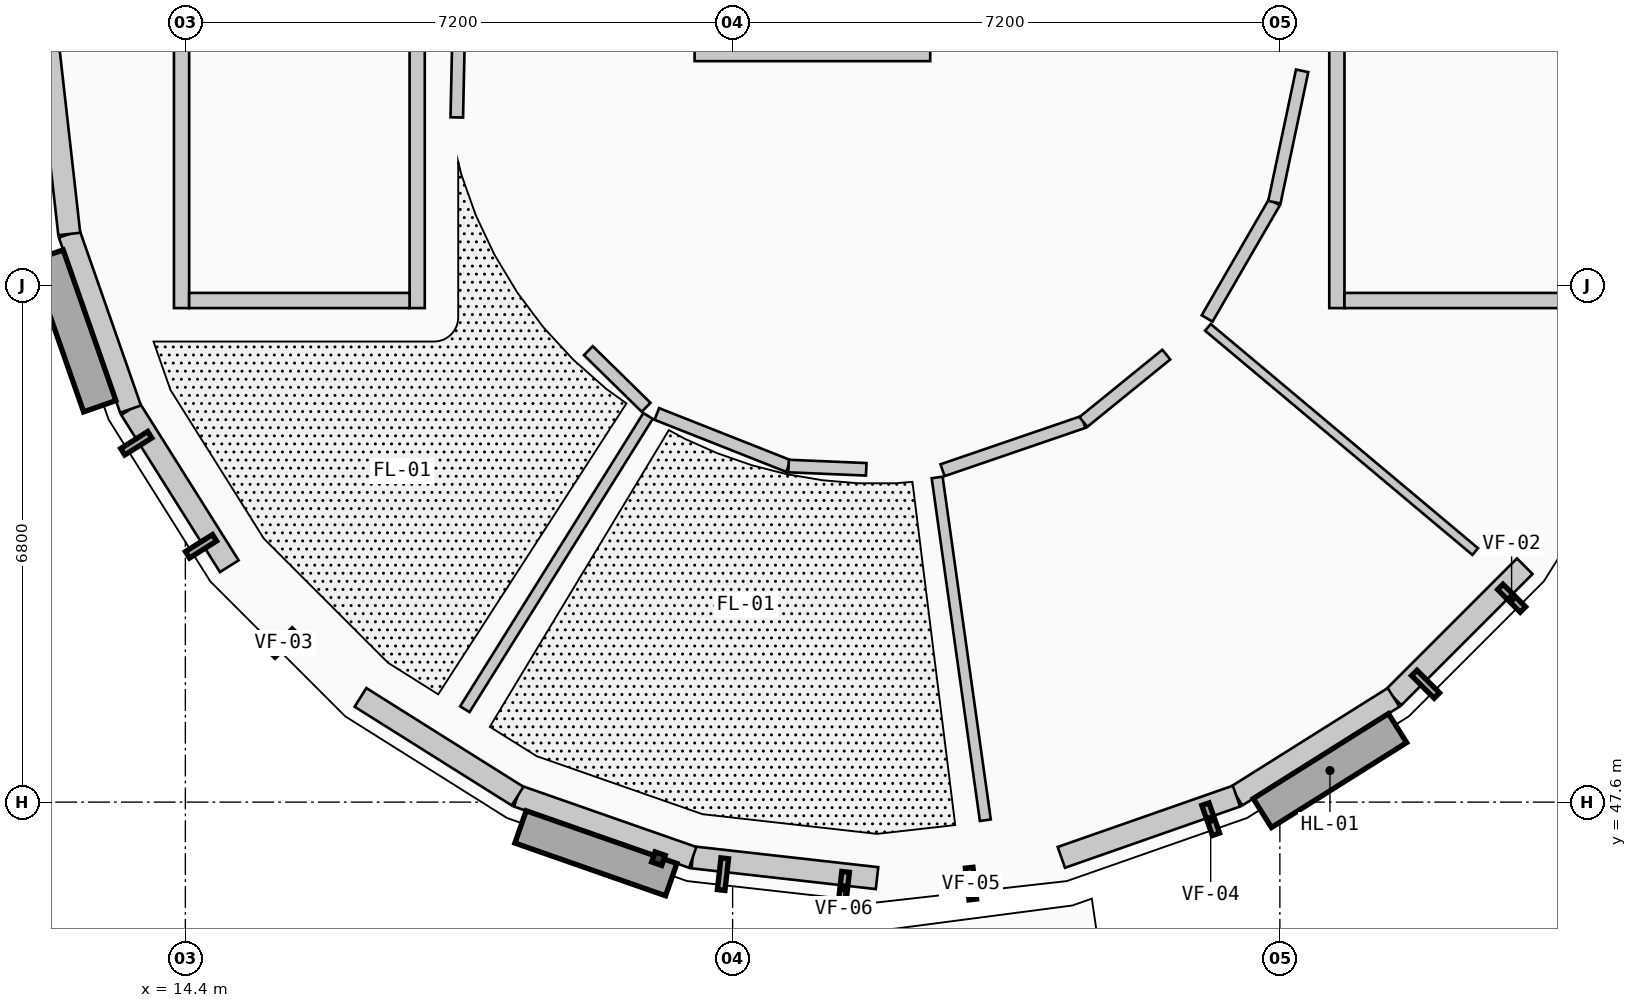
"""IFC4 building model, lengths in metres.
Left out: names, types, materials, properties, quantities, classifications, styles, units other than length and angle.
Written with IfcOpenShell. Run it as: python <this file> out.ifc"""

import sys

from ifc_helpers import new_model, si_unit, direction, frame, frame_2d, origin, origin_2d, place, context, subcontext, project, spatial, rectangle, circle, extrude, element, fill, save


model = new_model("IFC4")
c1 = context("Model", 3, precision=1e-05, world=origin(), true_north=direction((0.0, 1.0)))
c2 = subcontext(c1, "Body", "Model", "MODEL_VIEW")
j1 = project(units=[si_unit("LENGTHUNIT", "METRE"), si_unit("PLANEANGLEUNIT", "RADIAN")], contexts=[c1])
p1 = place(None, origin())
s1 = spatial("IfcSite", under=j1, at=p1, CompositionType="ELEMENT")
p2 = place(p1, origin())
s2 = spatial("IfcBuilding", under=s1, at=p2, CompositionType="ELEMENT")
p3 = place(p2, frame((0.0, 0.0, 4.55)))
s3 = spatial("IfcBuildingStorey", under=s2, at=p3, CompositionType="ELEMENT", Elevation=4.55)
for number, where, z_axis, x_axis in (
    (1, (13.12, 57.5, 0.0), (0.0, 0.0, 1.0), (1.0, 0.0, 0.0)),
    (2, (14.148, 52.996, 0.0), (0.0, 0.0, 1.0), (1.0, 0.0, 0.0)),
    (3, (17.028, 49.385, 0.0), (0.0, 0.0, 1.0), (1.0, 0.0, 0.0)),
    (4, (21.19, 47.38, 0.0), (0.0, 0.0, 1.0), (1.0, 0.0, 0.0)),
    (5, (25.81, 47.38, 0.0), (0.0, 0.0, 1.0), (1.0, 0.0, 0.0)),
    (6, (29.972, 49.385, 0.0), (0.0, 0.0, 1.0), (1.0, 0.0, 0.0)),
    (7, (19.54, 53.54, 0.0), (0.0, 0.0, 1.0), (1.0, 0.0, 0.0)),
    (8, (23.5, 51.9, 0.0), (0.0, 0.0, 1.0), (1.0, 0.0, 0.0)),
    (9, (27.46, 53.54, 0.0), (0.0, 0.0, 1.0), (1.0, 0.0, 0.0)),
):
    element("IfcColumn", number, at=place(p3, frame(where, z_axis=z_axis, x_axis=x_axis)), inside=s3, PredefinedType="COLUMN", context=c2, shape_type="SweptSolid", body=[
        extrude(rectangle(XDim=0.315, YDim=0.315, at=origin_2d()), origin(), (0.0, 0.0, 1.0), 4.2),
    ])
for number, where, z_axis, x_axis in (
    (10, (26.15, 46.154, 0.0), (0.0, 0.0, 1.0), (1.0, 0.0, 0.0)),
    (11, (15.613, 47.61, 0.0), (0.0, 0.0, 1.0), (1.0, 0.0, 0.0)),
    (12, (31.387, 47.61, 0.0), (0.0, 0.0, 1.0), (1.0, 0.0, 0.0)),
):
    element("IfcColumn", number, at=place(p3, frame(where, z_axis=z_axis, x_axis=x_axis)), inside=s3, PredefinedType="PILASTER", context=c2, shape_type="SweptSolid", body=[
        extrude(circle(Radius=0.19, at=origin_2d()), origin(), (0.0, 0.0, 1.0), 4.2),
    ])
p4 = place(p3, frame((32.022, 50.704, 0.0), z_axis=(0.0, 0.0, 1.0), x_axis=(-0.707106781187, -0.707106781187, 0.0)))
e13 = element("IfcWall", 13, at=p4, inside=s3, PredefinedType="ELEMENTEDWALL", context=c2, shape_type="SweptSolid", body=[
    extrude(rectangle(XDim=2.441, YDim=0.29, at=frame_2d((1.22, 0.0))), origin(), (0.0, 0.0, 1.0), 3.314),
])
p5 = place(p4, frame((0.695, 0.0, 0.85)))
e14 = element("IfcOpeningElement", 14, at=p5, cuts=e13, PredefinedType="OPENING", context=c2, shape_type="SweptSolid", body=[
    extrude(rectangle(XDim=1.05, YDim=1.35, at=frame_2d((0.525, 0.675))), frame((0.0, 0.155, 0.0), z_axis=(0.0, -1.0, 0.0), x_axis=(1.0, 0.0, 0.0)), (0.0, 0.0, 1.0), 0.31),
])
p6 = place(p3, frame((30.296, 48.978, 0.0), z_axis=(0.0, 0.0, 1.0), x_axis=(-0.846658434148, -0.532136726684, 0.0)))
e15 = element("IfcWall", 15, at=p6, inside=s3, PredefinedType="ELEMENTEDWALL", context=c2, shape_type="SweptSolid", body=[
    extrude(rectangle(XDim=2.441, YDim=0.29, at=frame_2d((1.221, 0.0))), origin(), (0.0, 0.0, 1.0), 3.314),
])
p7 = place(p6, frame((0.696, 0.0, 0.85)))
e16 = element("IfcOpeningElement", 16, at=p7, cuts=e15, PredefinedType="OPENING", context=c2, shape_type="SweptSolid", body=[
    extrude(rectangle(XDim=1.05, YDim=1.6, at=frame_2d((0.525, 0.8))), frame((0.0, 0.155, 0.0), z_axis=(0.0, -1.0, 0.0), x_axis=(1.0, 0.0, 0.0)), (0.0, 0.0, 1.0), 0.31),
])
p8 = place(p3, frame((28.229, 47.679, 0.0), z_axis=(0.0, 0.0, 1.0), x_axis=(-0.943919156274, -0.330176659411, 0.0)))
e17 = element("IfcWall", 17, at=p8, inside=s3, PredefinedType="ELEMENTEDWALL", context=c2, shape_type="SweptSolid", body=[
    extrude(rectangle(XDim=2.441, YDim=0.29, at=frame_2d((1.22, 0.0))), origin(), (0.0, 0.0, 1.0), 3.314),
])
p9 = place(p8, frame((0.695, 0.0, 0.85)))
e18 = element("IfcOpeningElement", 18, at=p9, cuts=e17, PredefinedType="OPENING", context=c2, shape_type="SweptSolid", body=[
    extrude(rectangle(XDim=1.05, YDim=1.9, at=frame_2d((0.525, 0.95))), frame((0.0, 0.155, 0.0), z_axis=(0.0, -1.0, 0.0), x_axis=(1.0, 0.0, 0.0)), (0.0, 0.0, 1.0), 0.31),
])
p10 = place(p3, frame((23.5, 46.6, 0.0), z_axis=(0.0, 0.0, 1.0), x_axis=(-0.993725340882, 0.111847873866, 0.0)))
e19 = element("IfcWall", 19, at=p10, inside=s3, PredefinedType="ELEMENTEDWALL", context=c2, shape_type="SweptSolid", body=[
    extrude(rectangle(XDim=2.44, YDim=0.29, at=frame_2d((1.22, 0.0))), origin(), (0.0, 0.0, 1.0), 3.314),
])
p11 = place(p10, frame((0.695, 0.0, 0.85)))
e20 = element("IfcOpeningElement", 20, at=p11, cuts=e19, PredefinedType="OPENING", context=c2, shape_type="SweptSolid", body=[
    extrude(rectangle(XDim=1.05, YDim=2.15, at=frame_2d((0.525, 1.075))), frame((0.0, 0.155, 0.0), z_axis=(0.0, -1.0, 0.0), x_axis=(1.0, 0.0, 0.0)), (0.0, 0.0, 1.0), 0.31),
])
p12 = place(p3, frame((21.075, 46.873, 0.0), z_axis=(0.0, 0.0, 1.0), x_axis=(-0.943919156274, 0.330176659411, 0.0)))
e21 = element("IfcWall", 21, at=p12, inside=s3, PredefinedType="ELEMENTEDWALL", context=c2, shape_type="SweptSolid", body=[
    extrude(rectangle(XDim=2.441, YDim=0.29, at=frame_2d((1.22, 0.0))), origin(), (0.0, 0.0, 1.0), 3.314),
])
p13 = place(p12, frame((0.68, 0.0, 0.85)))
e22 = element("IfcOpeningElement", 22, at=p13, cuts=e21, PredefinedType="OPENING", context=c2, shape_type="SweptSolid", body=[
    extrude(rectangle(XDim=1.08, YDim=1.5, at=frame_2d((0.54, 0.75))), frame((0.0, 0.155, 0.0), z_axis=(0.0, -1.0, 0.0), x_axis=(1.0, 0.0, 0.0)), (0.0, 0.0, 1.0), 0.31),
])
p14 = place(p3, frame((18.771, 47.679, 0.0), z_axis=(0.0, 0.0, 1.0), x_axis=(-0.846658434148, 0.532136726684, 0.0)))
e23 = element("IfcWall", 23, at=p14, inside=s3, PredefinedType="ELEMENTEDWALL", context=c2, shape_type="SweptSolid", body=[
    extrude(rectangle(XDim=2.441, YDim=0.29, at=frame_2d((1.221, 0.0))), origin(), (0.0, 0.0, 1.0), 3.314),
])
p15 = place(p14, frame((0.681, 0.0, 0.85)))
e24 = element("IfcOpeningElement", 24, at=p15, cuts=e23, PredefinedType="OPENING", context=c2, shape_type="SweptSolid", body=[
    extrude(rectangle(XDim=1.08, YDim=1.8, at=frame_2d((0.54, 0.9))), frame((0.0, 0.155, 0.0), z_axis=(0.0, -1.0, 0.0), x_axis=(1.0, 0.0, 0.0)), (0.0, 0.0, 1.0), 0.31),
])
p16 = place(p3, frame((14.978, 50.704, 0.0), z_axis=(0.0, 0.0, 1.0), x_axis=(-0.532136726684, 0.846658434148, 0.0)))
e25 = element("IfcWall", 25, at=p16, inside=s3, PredefinedType="ELEMENTEDWALL", context=c2, shape_type="SweptSolid", body=[
    extrude(rectangle(XDim=2.441, YDim=0.29, at=frame_2d((1.221, 0.0))), origin(), (0.0, 0.0, 1.0), 3.314),
])
p17 = place(p16, frame((0.671, 0.0, 0.85)))
e26 = element("IfcOpeningElement", 26, at=p17, cuts=e25, PredefinedType="OPENING", context=c2, shape_type="SweptSolid", body=[
    extrude(rectangle(XDim=1.1, YDim=1.25, at=frame_2d((0.55, 0.625))), frame((0.0, 0.155, 0.0), z_axis=(0.0, -1.0, 0.0), x_axis=(1.0, 0.0, 0.0)), (0.0, 0.0, 1.0), 0.31),
])
p18 = place(p3, frame((13.679, 52.771, 0.0), z_axis=(0.0, 0.0, 1.0), x_axis=(-0.330176659411, 0.943919156274, 0.0)))
e27 = element("IfcWall", 27, at=p18, inside=s3, PredefinedType="ELEMENTEDWALL", context=c2, shape_type="SweptSolid", body=[
    extrude(rectangle(XDim=2.441, YDim=0.29, at=frame_2d((1.22, 0.0))), origin(), (0.0, 0.0, 1.0), 3.314),
])
p19 = place(p18, frame((0.67, 0.0, 0.85)))
e28 = element("IfcOpeningElement", 28, at=p19, cuts=e27, PredefinedType="OPENING", context=c2, shape_type="SweptSolid", body=[
    extrude(rectangle(XDim=1.1, YDim=1.5, at=frame_2d((0.55, 0.75))), frame((0.0, 0.155, 0.0), z_axis=(0.0, -1.0, 0.0), x_axis=(1.0, 0.0, 0.0)), (0.0, 0.0, 1.0), 0.31),
])
p20 = place(p3, frame((12.873, 55.075, 0.0), z_axis=(0.0, 0.0, 1.0), x_axis=(-0.111847873866, 0.993725340882, 0.0)))
e29 = element("IfcWall", 29, at=p20, inside=s3, PredefinedType="ELEMENTEDWALL", context=c2, shape_type="SweptSolid", body=[
    extrude(rectangle(XDim=2.44, YDim=0.29, at=frame_2d((1.22, 0.0))), origin(), (0.0, 0.0, 1.0), 3.314),
])
p21 = place(p3, frame((29.55, 60.9, 0.0), z_axis=(0.0, 0.0, 1.0), x_axis=(0.0, -1.0, 0.0)))
e30 = element("IfcWall", 30, at=p21, inside=s3, PredefinedType="SHEAR", context=c2, shape_type="SweptSolid", body=[
    extrude(rectangle(XDim=6.8, YDim=0.2, at=frame_2d((3.4, 0.0))), origin(), (0.0, 0.0, 1.0), 3.96),
])
p22 = place(p21, frame((0.38, 0.0, 0.0)))
e31 = element("IfcOpeningElement", 31, at=p22, cuts=e30, PredefinedType="OPENING", context=c2, shape_type="SweptSolid", body=[
    extrude(rectangle(XDim=1.1, YDim=2.15, at=frame_2d((0.55, 1.075))), frame((0.0, 0.11, 0.0), z_axis=(0.0, -1.0, 0.0), x_axis=(1.0, 0.0, 0.0)), (0.0, 0.0, 1.0), 0.22),
])
p23 = place(p3, frame((29.65, 54.2, 0.0), z_axis=(0.0, 0.0, 1.0), x_axis=(1.0, 0.0, 0.0)))
e32 = element("IfcWall", 32, at=p23, inside=s3, PredefinedType="SHEAR", context=c2, shape_type="SweptSolid", body=[
    extrude(rectangle(XDim=2.9, YDim=0.2, at=frame_2d((1.45, 0.0))), origin(), (0.0, 0.0, 1.0), 3.96),
])
p24 = place(p3, frame((17.45, 54.1, 0.0), z_axis=(0.0, 0.0, 1.0), x_axis=(0.0, 1.0, 0.0)))
e33 = element("IfcWall", 33, at=p24, inside=s3, PredefinedType="SHEAR", context=c2, shape_type="SweptSolid", body=[
    extrude(rectangle(XDim=6.8, YDim=0.2, at=frame_2d((3.4, 0.0))), origin(), (0.0, 0.0, 1.0), 3.96),
])
p25 = place(p24, frame((0.38, 0.0, 0.0)))
e34 = element("IfcOpeningElement", 34, at=p25, cuts=e33, PredefinedType="OPENING", context=c2, shape_type="SweptSolid", body=[
    extrude(rectangle(XDim=1.1, YDim=2.15, at=frame_2d((0.55, 1.075))), frame((0.0, 0.11, 0.0), z_axis=(0.0, -1.0, 0.0), x_axis=(1.0, 0.0, 0.0)), (0.0, 0.0, 1.0), 0.22),
])
p26 = place(p3, frame((14.35, 54.1, 0.0), z_axis=(0.0, 0.0, 1.0), x_axis=(0.0, 1.0, 0.0)))
e35 = element("IfcWall", 35, at=p26, inside=s3, PredefinedType="SHEAR", context=c2, shape_type="SweptSolid", body=[
    extrude(rectangle(XDim=6.8, YDim=0.2, at=frame_2d((3.4, 0.0))), origin(), (0.0, 0.0, 1.0), 3.96),
])
p27 = place(p3, frame((17.35, 54.2, 0.0), z_axis=(0.0, 0.0, 1.0), x_axis=(-1.0, 0.0, 0.0)))
e36 = element("IfcWall", 36, at=p27, inside=s3, PredefinedType="SHEAR", context=c2, shape_type="SweptSolid", body=[
    extrude(rectangle(XDim=2.9, YDim=0.2, at=frame_2d((1.45, 0.0))), origin(), (0.0, 0.0, 1.0), 3.96),
])
p28 = place(p3, frame((21.1, 57.462, 0.0), z_axis=(0.0, 0.0, 1.0), x_axis=(1.0, 0.0, 0.0)))
e37 = element("IfcWall", 37, at=p28, inside=s3, PredefinedType="SHEAR", context=c2, shape_type="SweptSolid", body=[
    extrude(rectangle(XDim=3.1, YDim=0.225, at=frame_2d((1.55, 0.0))), origin(), (0.0, 0.0, 1.0), 3.96),
])
p29 = place(p28, frame((0.95, 0.0, 0.0)))
e38 = element("IfcOpeningElement", 38, at=p29, cuts=e37, PredefinedType="OPENING", context=c2, shape_type="SweptSolid", body=[
    extrude(rectangle(XDim=1.2, YDim=2.2, at=frame_2d((0.6, 1.1))), frame((0.0, 0.123, 0.0), z_axis=(0.0, -1.0, 0.0), x_axis=(1.0, 0.0, 0.0)), (0.0, 0.0, 1.0), 0.245),
])
p30 = place(p3, frame((20.488, 52.681, 0.0), z_axis=(0.0, 0.0, 1.0), x_axis=(-0.529892832375, -0.848064612042, 0.0)))
e39 = element("IfcWall", 39, at=p30, inside=s3, PredefinedType="PARTITIONING", context=c2, shape_type="SweptSolid", body=[
    extrude(rectangle(XDim=4.55, YDim=0.145, at=frame_2d((2.275, 0.0))), origin(), (0.0, 0.0, 1.0), 3.279),
])
p31 = place(p3, frame((24.291, 51.872, 0.0), z_axis=(0.0, 0.0, 1.0), x_axis=(0.139214585132, -0.990262237635, 0.0)))
e40 = element("IfcWall", 40, at=p31, inside=s3, PredefinedType="PARTITIONING", context=c2, shape_type="SweptSolid", body=[
    extrude(rectangle(XDim=4.554, YDim=0.145, at=frame_2d((2.277, 0.0))), origin(), (0.0, 0.0, 1.0), 3.279),
])
p32 = place(p3, frame((27.853, 53.847, 0.0), z_axis=(0.0, 0.0, 1.0), x_axis=(0.766177182771, -0.64262938355, 0.0)))
e41 = element("IfcWall", 41, at=p32, inside=s3, PredefinedType="PARTITIONING", context=c2, shape_type="SweptSolid", body=[
    extrude(rectangle(XDim=4.59, YDim=0.115, at=frame_2d((2.295, 0.0))), origin(), (0.0, 0.0, 1.0), 3.279),
])
p33 = place(p3, frame((18.015, 58.628, 0.0), z_axis=(0.0, 0.0, 1.0), x_axis=(-0.021760263499, -0.999763217433, 0.0)))
e42 = element("IfcWall", 42, at=p33, inside=s3, PredefinedType="PARTITIONING", context=c2, shape_type="SweptSolid", body=[
    extrude(rectangle(XDim=2.02, YDim=0.165, at=frame_2d((1.01, 0.0))), origin(), (0.0, 0.0, 1.0), 3.279),
])
p34 = place(p3, frame((19.702, 53.54, 0.0), z_axis=(0.0, 0.0, 1.0), x_axis=(0.714068342312, -0.700075997666, 0.0)))
e43 = element("IfcWall", 43, at=p34, inside=s3, PredefinedType="PARTITIONING", context=c2, shape_type="SweptSolid", body=[
    extrude(rectangle(XDim=1.064, YDim=0.165, at=frame_2d((0.532, 0.0))), origin(), (0.0, 0.0, 1.0), 3.279),
])
p35 = place(p3, frame((20.603, 52.707, 0.0), z_axis=(0.0, 0.0, 1.0), x_axis=(0.929969054131, -0.367637808663, 0.0)))
e44 = element("IfcWall", 44, at=p35, inside=s3, PredefinedType="PARTITIONING", context=c2, shape_type="SweptSolid", body=[
    extrude(rectangle(XDim=1.864, YDim=0.165, at=frame_2d((0.932, 0.0))), origin(), (0.0, 0.0, 1.0), 3.279),
])
p36 = place(p35, frame((0.321, 0.0, 0.0)))
e45 = element("IfcOpeningElement", 45, at=p36, cuts=e44, PredefinedType="OPENING", context=c2, shape_type="SweptSolid", body=[
    extrude(rectangle(XDim=1.22, YDim=2.18, at=frame_2d((0.61, 1.09))), frame((0.0, 0.093, 0.0), z_axis=(0.0, -1.0, 0.0), x_axis=(1.0, 0.0, 0.0)), (0.0, 0.0, 1.0), 0.185),
])
p37 = place(p3, frame((22.336, 52.022, 0.0), z_axis=(0.0, 0.0, 1.0), x_axis=(0.999117282865, -0.042007797846, 0.0)))
e46 = element("IfcWall", 46, at=p37, inside=s3, PredefinedType="PARTITIONING", context=c2, shape_type="SweptSolid", body=[
    extrude(rectangle(XDim=1.023, YDim=0.165, at=frame_2d((0.511, 0.0))), origin(), (0.0, 0.0, 1.0), 3.279),
])
p38 = place(p3, frame((24.362, 51.967, 0.0), z_axis=(0.0, 0.0, 1.0), x_axis=(0.94599509797, 0.32418092883, 0.0)))
e47 = element("IfcWall", 47, at=p38, inside=s3, PredefinedType="PARTITIONING", context=c2, shape_type="SweptSolid", body=[
    extrude(rectangle(XDim=1.959, YDim=0.165, at=frame_2d((0.979, 0.0))), origin(), (0.0, 0.0, 1.0), 3.279),
])
p39 = place(p38, frame((0.52, 0.0, 0.0)))
e48 = element("IfcOpeningElement", 48, at=p39, cuts=e47, PredefinedType="OPENING", context=c2, shape_type="SweptSolid", body=[
    extrude(rectangle(XDim=0.92, YDim=2.24, at=frame_2d((0.46, 1.12))), frame((0.0, 0.093, 0.0), z_axis=(0.0, -1.0, 0.0), x_axis=(1.0, 0.0, 0.0)), (0.0, 0.0, 1.0), 0.185),
])
p40 = place(p3, frame((26.215, 52.602, 0.0), z_axis=(0.0, 0.0, 1.0), x_axis=(0.77622027024, 0.630461808572, 0.0)))
e49 = element("IfcWall", 49, at=p40, inside=s3, PredefinedType="PARTITIONING", context=c2, shape_type="SweptSolid", body=[
    extrude(rectangle(XDim=1.405, YDim=0.165, at=frame_2d((0.703, 0.0))), origin(), (0.0, 0.0, 1.0), 3.279),
])
p41 = place(p3, frame((27.843, 53.964, 0.0), z_axis=(0.0, 0.0, 1.0), x_axis=(0.500998134269, 0.865448363254, 0.0)))
e50 = element("IfcWall", 50, at=p41, inside=s3, PredefinedType="PARTITIONING", context=c2, shape_type="SweptSolid", body=[
    extrude(rectangle(XDim=1.767, YDim=0.165, at=frame_2d((0.883, 0.0))), origin(), (0.0, 0.0, 1.0), 3.279),
])
p42 = place(p41, frame((0.408, 0.0, 0.0)))
e51 = element("IfcOpeningElement", 51, at=p42, cuts=e50, PredefinedType="OPENING", context=c2, shape_type="SweptSolid", body=[
    extrude(rectangle(XDim=0.95, YDim=2.16, at=frame_2d((0.475, 1.08))), frame((0.0, 0.093, 0.0), z_axis=(0.0, -1.0, 0.0), x_axis=(1.0, 0.0, 0.0)), (0.0, 0.0, 1.0), 0.185),
])
p43 = place(p3, frame((28.728, 55.493, 0.0), z_axis=(0.0, 0.0, 1.0), x_axis=(0.206546592113, 0.978436766116, 0.0)))
e52 = element("IfcWall", 52, at=p43, inside=s3, PredefinedType="PARTITIONING", context=c2, shape_type="SweptSolid", body=[
    extrude(rectangle(XDim=1.767, YDim=0.165, at=frame_2d((0.884, 0.0))), origin(), (0.0, 0.0, 1.0), 3.279),
])
p44 = place(p5, origin())
e53 = element("IfcWindow", 53, at=p44, inside=s3, PartitioningType="SINGLE_PANEL", PredefinedType="WINDOW", context=c2, shape_type="SweptSolid", body=[
    extrude(rectangle(XDim=1.05, YDim=1.35, at=frame_2d((0.525, 0.675))), frame((0.0, 0.03, 0.0), z_axis=(0.0, -1.0, 0.0), x_axis=(1.0, 0.0, 0.0)), (0.0, 0.0, 1.0), 0.06),
])
fill(e14, e53)
p45 = place(p7, origin())
e54 = element("IfcWindow", 54, at=p45, inside=s3, PartitioningType="SINGLE_PANEL", PredefinedType="WINDOW", context=c2, shape_type="SweptSolid", body=[
    extrude(rectangle(XDim=1.05, YDim=1.6, at=frame_2d((0.525, 0.8))), frame((0.0, 0.03, 0.0), z_axis=(0.0, -1.0, 0.0), x_axis=(1.0, 0.0, 0.0)), (0.0, 0.0, 1.0), 0.06),
])
fill(e16, e54)
p46 = place(p9, origin())
e55 = element("IfcWindow", 55, at=p46, inside=s3, PartitioningType="SINGLE_PANEL", PredefinedType="WINDOW", context=c2, shape_type="SweptSolid", body=[
    extrude(rectangle(XDim=1.05, YDim=1.9, at=frame_2d((0.525, 0.95))), frame((0.0, 0.03, 0.0), z_axis=(0.0, -1.0, 0.0), x_axis=(1.0, 0.0, 0.0)), (0.0, 0.0, 1.0), 0.06),
])
fill(e18, e55)
p47 = place(p11, origin())
e56 = element("IfcWindow", 56, at=p47, inside=s3, PartitioningType="SINGLE_PANEL", PredefinedType="WINDOW", context=c2, shape_type="SweptSolid", body=[
    extrude(rectangle(XDim=1.05, YDim=2.15, at=frame_2d((0.525, 1.075))), frame((0.0, 0.03, 0.0), z_axis=(0.0, -1.0, 0.0), x_axis=(1.0, 0.0, 0.0)), (0.0, 0.0, 1.0), 0.06),
])
fill(e20, e56)
p48 = place(p13, origin())
e57 = element("IfcWindow", 57, at=p48, inside=s3, PartitioningType="SINGLE_PANEL", PredefinedType="WINDOW", context=c2, shape_type="SweptSolid", body=[
    extrude(rectangle(XDim=1.08, YDim=1.5, at=frame_2d((0.54, 0.75))), frame((0.0, 0.03, 0.0), z_axis=(0.0, -1.0, 0.0), x_axis=(1.0, 0.0, 0.0)), (0.0, 0.0, 1.0), 0.06),
])
fill(e22, e57)
p49 = place(p15, origin())
e58 = element("IfcWindow", 58, at=p49, inside=s3, PartitioningType="SINGLE_PANEL", PredefinedType="WINDOW", context=c2, shape_type="SweptSolid", body=[
    extrude(rectangle(XDim=1.08, YDim=1.8, at=frame_2d((0.54, 0.9))), frame((0.0, 0.03, 0.0), z_axis=(0.0, -1.0, 0.0), x_axis=(1.0, 0.0, 0.0)), (0.0, 0.0, 1.0), 0.06),
])
fill(e24, e58)
p50 = place(p17, origin())
e59 = element("IfcWindow", 59, at=p50, inside=s3, PartitioningType="SINGLE_PANEL", PredefinedType="WINDOW", context=c2, shape_type="SweptSolid", body=[
    extrude(rectangle(XDim=1.1, YDim=1.25, at=frame_2d((0.55, 0.625))), frame((0.0, 0.03, 0.0), z_axis=(0.0, -1.0, 0.0), x_axis=(1.0, 0.0, 0.0)), (0.0, 0.0, 1.0), 0.06),
])
fill(e26, e59)
p51 = place(p19, origin())
e60 = element("IfcWindow", 60, at=p51, inside=s3, PartitioningType="SINGLE_PANEL", PredefinedType="WINDOW", context=c2, shape_type="SweptSolid", body=[
    extrude(rectangle(XDim=1.1, YDim=1.5, at=frame_2d((0.55, 0.75))), frame((0.0, 0.03, 0.0), z_axis=(0.0, -1.0, 0.0), x_axis=(1.0, 0.0, 0.0)), (0.0, 0.0, 1.0), 0.06),
])
fill(e28, e60)
p52 = place(p25, origin())
e61 = element("IfcDoor", 61, at=p52, inside=s3, OperationType="SINGLE_SWING_RIGHT", PredefinedType="DOOR", context=c2, shape_type="SweptSolid", body=[
    extrude(rectangle(XDim=1.1, YDim=2.15, at=frame_2d((0.55, 1.075))), frame((0.0, 0.025, 0.0), z_axis=(0.0, -1.0, 0.0), x_axis=(1.0, 0.0, 0.0)), (0.0, 0.0, 1.0), 0.05),
])
fill(e34, e61)
p53 = place(p29, origin())
e62 = element("IfcDoor", 62, at=p53, inside=s3, OperationType="DOUBLE_DOOR_SLIDING", PredefinedType="DOOR", context=c2, shape_type="SweptSolid", body=[
    extrude(rectangle(XDim=1.2, YDim=2.2, at=frame_2d((0.6, 1.1))), frame((0.0, 0.025, 0.0), z_axis=(0.0, -1.0, 0.0), x_axis=(1.0, 0.0, 0.0)), (0.0, 0.0, 1.0), 0.05),
])
fill(e38, e62)
p54 = place(p36, origin())
e63 = element("IfcDoor", 63, at=p54, inside=s3, OperationType="SINGLE_SWING_RIGHT", PredefinedType="DOOR", context=c2, shape_type="SweptSolid", body=[
    extrude(rectangle(XDim=1.22, YDim=2.18, at=frame_2d((0.61, 1.09))), frame((0.0, 0.025, 0.0), z_axis=(0.0, -1.0, 0.0), x_axis=(1.0, 0.0, 0.0)), (0.0, 0.0, 1.0), 0.05),
])
fill(e45, e63)
p55 = place(p39, origin())
e64 = element("IfcDoor", 64, at=p55, inside=s3, OperationType="SINGLE_SWING_LEFT", PredefinedType="DOOR", context=c2, shape_type="SweptSolid", body=[
    extrude(rectangle(XDim=0.92, YDim=2.24, at=frame_2d((0.46, 1.12))), frame((0.0, 0.025, 0.0), z_axis=(0.0, -1.0, 0.0), x_axis=(1.0, 0.0, 0.0)), (0.0, 0.0, 1.0), 0.05),
])
fill(e48, e64)
p56 = place(p42, origin())
e65 = element("IfcDoor", 65, at=p56, inside=s3, OperationType="SINGLE_SWING_RIGHT", PredefinedType="DOOR", context=c2, shape_type="SweptSolid", body=[
    extrude(rectangle(XDim=0.95, YDim=2.16, at=frame_2d((0.475, 1.08))), frame((0.0, 0.025, 0.0), z_axis=(0.0, -1.0, 0.0), x_axis=(1.0, 0.0, 0.0)), (0.0, 0.0, 1.0), 0.05),
])
fill(e51, e65)
save(model, sys.argv[1])
